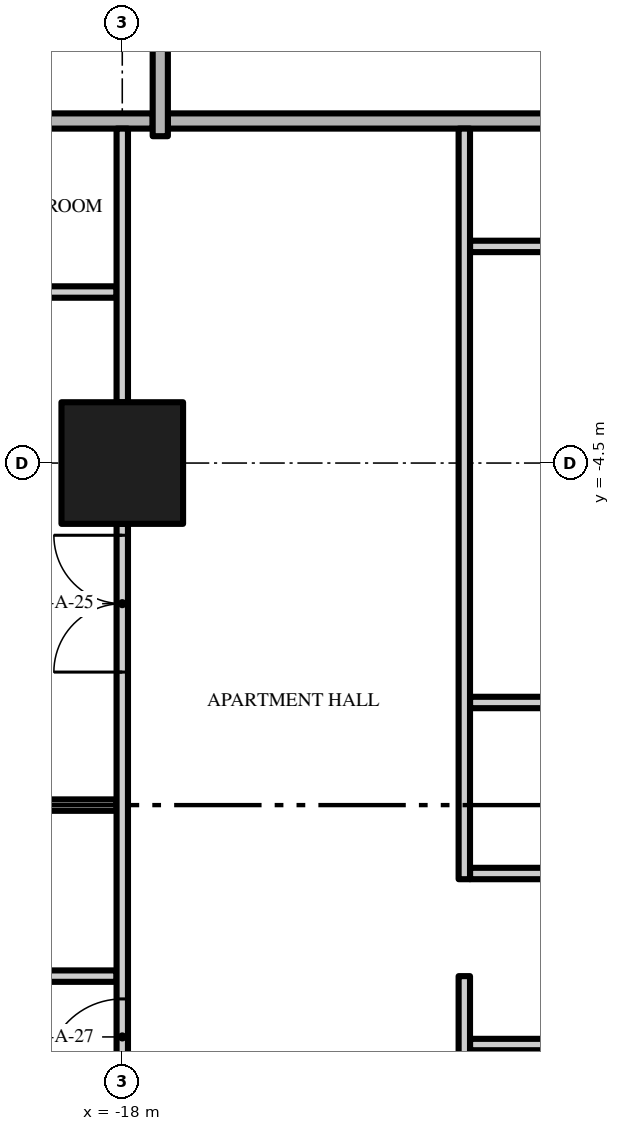
"""IFC4 building model, lengths in metres.
Left out: names, types, materials, properties, quantities, classifications, styles, units other than length and angle.
Written with IfcOpenShell. Run it as: python <this file> out.ifc"""

import sys

from ifc_helpers import new_model, si_unit, direction, frame, frame_2d, origin, origin_2d, place, context, subcontext, project, spatial, rectangle, extrude, element, fill, save


model = new_model("IFC4")
c1 = context("Model", 3, precision=1e-05, world=origin(), true_north=direction((0.0, 1.0)))
c2 = subcontext(c1, "Body", "Model", "MODEL_VIEW")
j1 = project(units=[si_unit("LENGTHUNIT", "METRE"), si_unit("PLANEANGLEUNIT", "RADIAN")], contexts=[c1])
p1 = place(None, origin())
s1 = spatial("IfcSite", under=j1, at=p1, CompositionType="ELEMENT")
p2 = place(p1, origin())
s2 = spatial("IfcBuilding", under=s1, at=p2, CompositionType="ELEMENT")
p3 = place(p2, frame((0.0, 0.0, 15.0)))
s3 = spatial("IfcBuildingStorey", under=s2, at=p3, CompositionType="ELEMENT", Elevation=15.0)
p4 = place(p3, frame((-18.0, -4.5, 0.0), z_axis=(0.0, 0.0, 1.0), x_axis=(1.0, 0.0, 0.0)))
e1 = element("IfcColumn", 1, at=p4, inside=s3, PredefinedType="COLUMN", context=c2, shape_type="SweptSolid", body=[
    extrude(rectangle(XDim=1.6, YDim=1.6, at=origin_2d()), origin(), (0.0, 0.0, 1.0), 3.5),
])
p5 = place(p3, frame((-13.425, -12.15, 0.0), z_axis=(0.0, 0.0, 1.0), x_axis=(1.0, 0.0, 0.0)))
e2 = element("IfcWall", 2, at=p5, inside=s3, PredefinedType="PARTITIONING", context=c2, shape_type="SweptSolid", body=[
    extrude(rectangle(XDim=4.35, YDim=0.15, at=frame_2d((2.175, 0.0))), origin(), (0.0, 0.0, 1.0), 3.5),
])
p6 = place(p3, frame((-20.925, -11.25, 0.0), z_axis=(0.0, 0.0, 1.0), x_axis=(1.0, 0.0, 0.0)))
e3 = element("IfcWall", 3, at=p6, inside=s3, PredefinedType="PARTITIONING", context=c2, shape_type="SweptSolid", body=[
    extrude(rectangle(XDim=2.85, YDim=0.15, at=frame_2d((1.425, 0.0))), origin(), (0.0, 0.0, 1.0), 3.5),
])
p7 = place(p3, frame((-13.425, -9.9, 0.0), z_axis=(0.0, 0.0, 1.0), x_axis=(1.0, 0.0, 0.0)))
e4 = element("IfcWall", 4, at=p7, inside=s3, PredefinedType="PARTITIONING", context=c2, shape_type="SweptSolid", body=[
    extrude(rectangle(XDim=4.35, YDim=0.15, at=frame_2d((2.175, 0.0))), origin(), (0.0, 0.0, 1.0), 3.5),
])
p8 = place(p7, frame((1.75, 0.0, 0.0)))
e5 = element("IfcOpeningElement", 5, at=p8, cuts=e4, PredefinedType="OPENING", context=c2, shape_type="SweptSolid", body=[
    extrude(rectangle(XDim=0.9, YDim=2.1, at=frame_2d((0.45, 1.05))), frame((0.0, 0.085, 0.0), z_axis=(0.0, -1.0, 0.0), x_axis=(1.0, 0.0, 0.0)), (0.0, 0.0, 1.0), 0.17),
])
p9 = place(p3, frame((-26.7, -9.0, 0.0), z_axis=(0.0, 0.0, 1.0), x_axis=(1.0, 0.0, 0.0)))
e6 = element("IfcWall", 6, at=p9, inside=s3, PredefinedType="PARTITIONING", context=c2, shape_type="SweptSolid", body=[
    extrude(rectangle(XDim=8.625, YDim=0.15, at=frame_2d((4.312, 0.0))), origin(), (0.0, 0.0, 1.0), 3.5),
])
p10 = place(p3, frame((-13.425, -7.65, 0.0), z_axis=(0.0, 0.0, 1.0), x_axis=(1.0, 0.0, 0.0)))
e7 = element("IfcWall", 7, at=p10, inside=s3, PredefinedType="PARTITIONING", context=c2, shape_type="SweptSolid", body=[
    extrude(rectangle(XDim=4.35, YDim=0.15, at=frame_2d((2.175, 0.0))), origin(), (0.0, 0.0, 1.0), 3.5),
])
p11 = place(p3, frame((-20.925, -2.25, 0.0), z_axis=(0.0, 0.0, 1.0), x_axis=(1.0, 0.0, 0.0)))
e8 = element("IfcWall", 8, at=p11, inside=s3, PredefinedType="PARTITIONING", context=c2, shape_type="SweptSolid", body=[
    extrude(rectangle(XDim=2.85, YDim=0.15, at=frame_2d((1.425, 0.0))), origin(), (0.0, 0.0, 1.0), 3.5),
])
p12 = place(p3, frame((-13.425, -1.65, 0.0), z_axis=(0.0, 0.0, 1.0), x_axis=(1.0, 0.0, 0.0)))
e9 = element("IfcWall", 9, at=p12, inside=s3, PredefinedType="PARTITIONING", context=c2, shape_type="SweptSolid", body=[
    extrude(rectangle(XDim=4.35, YDim=0.15, at=frame_2d((2.175, 0.0))), origin(), (0.0, 0.0, 1.0), 3.5),
])
p13 = place(p3, frame((-17.4, 0.0, 0.0), z_axis=(0.0, 0.0, 1.0), x_axis=(1.0, 0.0, 0.0)))
e10 = element("IfcWall", 10, at=p13, inside=s3, PredefinedType="PARTITIONING", context=c2, shape_type="SweptSolid", body=[
    extrude(rectangle(XDim=12.8, YDim=0.2, at=frame_2d((6.4, 0.0))), origin(), (0.0, 0.0, 1.0), 3.5),
])
p14 = place(p3, frame((-26.7, 0.0, 0.0), z_axis=(0.0, 0.0, 1.0), x_axis=(1.0, 0.0, 0.0)))
e11 = element("IfcWall", 11, at=p14, inside=s3, PredefinedType="PARTITIONING", context=c2, shape_type="SweptSolid", body=[
    extrude(rectangle(XDim=9.1, YDim=0.2, at=frame_2d((4.55, 0.0))), origin(), (0.0, 0.0, 1.0), 3.5),
])
p15 = place(p3, frame((-18.0, -12.7, 0.0), z_axis=(0.0, 0.0, 1.0), x_axis=(0.0, 1.0, 0.0)))
e12 = element("IfcWall", 12, at=p15, inside=s3, PredefinedType="PARTITIONING", context=c2, shape_type="SweptSolid", body=[
    extrude(rectangle(XDim=7.4, YDim=0.15, at=frame_2d((3.7, 0.0))), origin(), (0.0, 0.0, 1.0), 3.5),
])
p16 = place(p15, frame((5.45, 0.0, 0.0)))
e13 = element("IfcOpeningElement", 13, at=p16, cuts=e12, PredefinedType="OPENING", context=c2, shape_type="SweptSolid", body=[
    extrude(rectangle(XDim=1.8, YDim=2.4, at=frame_2d((0.9, 1.2))), frame((0.0, 0.085, 0.0), z_axis=(0.0, -1.0, 0.0), x_axis=(1.0, 0.0, 0.0)), (0.0, 0.0, 1.0), 0.17),
])
p17 = place(p15, frame((0.15, 0.0, 0.0)))
e14 = element("IfcOpeningElement", 14, at=p17, cuts=e12, PredefinedType="OPENING", context=c2, shape_type="SweptSolid", body=[
    extrude(rectangle(XDim=1.0, YDim=2.4, at=frame_2d((0.5, 1.2))), frame((0.0, 0.085, 0.0), z_axis=(0.0, -1.0, 0.0), x_axis=(1.0, 0.0, 0.0)), (0.0, 0.0, 1.0), 0.17),
])
p18 = place(p3, frame((-18.0, -3.7, 0.0), z_axis=(0.0, 0.0, 1.0), x_axis=(0.0, 1.0, 0.0)))
e15 = element("IfcWall", 15, at=p18, inside=s3, PredefinedType="PARTITIONING", context=c2, shape_type="SweptSolid", body=[
    extrude(rectangle(XDim=3.6, YDim=0.15, at=frame_2d((1.8, 0.0))), origin(), (0.0, 0.0, 1.0), 3.5),
])
p19 = place(p3, frame((-17.5, -0.2, 0.0), z_axis=(0.0, 0.0, 1.0), x_axis=(0.0, 1.0, 0.0)))
e16 = element("IfcWall", 16, at=p19, inside=s3, PredefinedType="PARTITIONING", context=c2, shape_type="SweptSolid", body=[
    extrude(rectangle(XDim=3.9, YDim=0.2, at=frame_2d((1.95, 0.0))), origin(), (0.0, 0.0, 1.0), 3.5),
])
p20 = place(p3, frame((-13.5, -11.25, 0.0), z_axis=(0.0, 0.0, 1.0), x_axis=(0.0, -1.0, 0.0)))
e17 = element("IfcWall", 17, at=p20, inside=s3, PredefinedType="PARTITIONING", context=c2, shape_type="SweptSolid", body=[
    extrude(rectangle(XDim=10.95, YDim=0.15, at=frame_2d((5.475, 0.0))), origin(), (0.0, 0.0, 1.0), 3.5),
])
p21 = place(p20, frame((1.8, 0.0, 0.0)))
e18 = element("IfcOpeningElement", 18, at=p21, cuts=e17, PredefinedType="OPENING", context=c2, shape_type="SweptSolid", body=[
    extrude(rectangle(XDim=0.8, YDim=2.0, at=frame_2d((0.4, 1.0))), frame((0.0, 0.085, 0.0), z_axis=(0.0, -1.0, 0.0), x_axis=(1.0, 0.0, 0.0)), (0.0, 0.0, 1.0), 0.17),
])
p22 = place(p20, frame((9.95, 0.0, 0.0)))
e19 = element("IfcOpeningElement", 19, at=p22, cuts=e17, PredefinedType="OPENING", context=c2, shape_type="SweptSolid", body=[
    extrude(rectangle(XDim=0.8, YDim=2.0, at=frame_2d((0.4, 1.0))), frame((0.0, 0.085, 0.0), z_axis=(0.0, -1.0, 0.0), x_axis=(1.0, 0.0, 0.0)), (0.0, 0.0, 1.0), 0.17),
])
p23 = place(p3, frame((-13.5, -9.975, 0.0), z_axis=(0.0, 0.0, 1.0), x_axis=(0.0, 1.0, 0.0)))
e20 = element("IfcWall", 20, at=p23, inside=s3, PredefinedType="PARTITIONING", context=c2, shape_type="SweptSolid", body=[
    extrude(rectangle(XDim=9.875, YDim=0.15, at=frame_2d((4.938, 0.0))), origin(), (0.0, 0.0, 1.0), 3.5),
])
p24 = place(p16, origin())
e21 = element("IfcDoor", 21, at=p24, inside=s3, OperationType="DOUBLE_DOOR_SINGLE_SWING", PredefinedType="DOOR", context=c2, shape_type="SweptSolid", body=[
    extrude(rectangle(XDim=1.8, YDim=2.4, at=frame_2d((0.9, 1.2))), frame((0.0, 0.025, 0.0), z_axis=(0.0, -1.0, 0.0), x_axis=(1.0, 0.0, 0.0)), (0.0, 0.0, 1.0), 0.05),
])
fill(e13, e21)
p25 = place(p17, origin())
e22 = element("IfcDoor", 22, at=p25, inside=s3, OperationType="SINGLE_SWING_LEFT", PredefinedType="DOOR", context=c2, shape_type="SweptSolid", body=[
    extrude(rectangle(XDim=1.0, YDim=2.4, at=frame_2d((0.5, 1.2))), frame((0.0, 0.025, 0.0), z_axis=(0.0, -1.0, 0.0), x_axis=(1.0, 0.0, 0.0)), (0.0, 0.0, 1.0), 0.05),
])
fill(e14, e22)
save(model, sys.argv[1])
